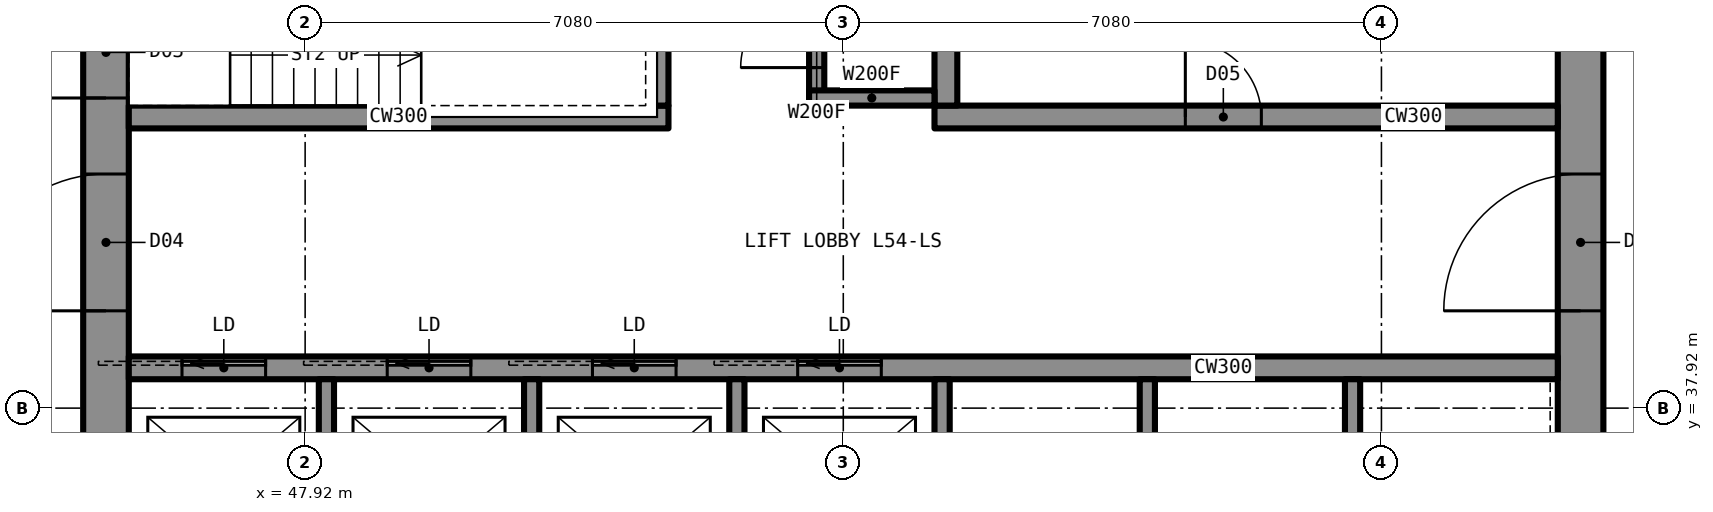
"""IFC4 building model, lengths in metres.
Left out: names, types, materials, properties, quantities, classifications, styles, units other than length and angle.
Written with IfcOpenShell. Run it as: python <this file> out.ifc"""

import sys

from ifc_helpers import new_model, si_unit, direction, frame, frame_2d, origin, place, context, subcontext, project, spatial, rectangle, extrude, element, fill, save


model = new_model("IFC4")
c1 = context("Model", 3, precision=1e-05, world=origin(), true_north=direction((0.0, 1.0)))
c2 = subcontext(c1, "Body", "Model", "MODEL_VIEW")
j1 = project(units=[si_unit("LENGTHUNIT", "METRE"), si_unit("PLANEANGLEUNIT", "RADIAN")], contexts=[c1])
p1 = place(None, origin())
s1 = spatial("IfcSite", under=j1, at=p1, CompositionType="ELEMENT")
p2 = place(p1, origin())
s2 = spatial("IfcBuilding", under=s1, at=p2, CompositionType="ELEMENT")
p3 = place(p2, frame((0.0, 0.0, 193.3)))
s3 = spatial("IfcBuildingStorey", under=s2, at=p3, CompositionType="ELEMENT", Elevation=193.3)
p4 = place(p3, frame((64.7, 35.6, 0.0), z_axis=(0.0, 0.0, 1.0), x_axis=(0.0, 1.0, 0.0)))
e1 = element("IfcWall", 1, at=p4, inside=s3, PredefinedType="SHEAR", context=c2, shape_type="SweptSolid", body=[
    extrude(rectangle(XDim=18.8, YDim=0.6, at=frame_2d((9.4, 0.0))), origin(), (0.0, 0.0, 1.0), 3.5),
])
p5 = place(p4, frame((13.4, 0.0, 0.0)))
e2 = element("IfcOpeningElement", 2, at=p5, cuts=e1, PredefinedType="OPENING", context=c2, shape_type="SweptSolid", body=[
    extrude(rectangle(XDim=1.8, YDim=2.2, at=frame_2d((0.9, 1.1))), frame((0.0, 0.31, 0.0), z_axis=(0.0, -1.0, 0.0), x_axis=(1.0, 0.0, 0.0)), (0.0, 0.0, 1.0), 0.62),
])
p6 = place(p4, frame((3.6, 0.0, 0.0)))
e3 = element("IfcOpeningElement", 3, at=p6, cuts=e1, PredefinedType="OPENING", context=c2, shape_type="SweptSolid", body=[
    extrude(rectangle(XDim=1.8, YDim=2.2, at=frame_2d((0.9, 1.1))), frame((0.0, 0.31, 0.0), z_axis=(0.0, -1.0, 0.0), x_axis=(1.0, 0.0, 0.0)), (0.0, 0.0, 1.0), 0.62),
])
p7 = place(p3, frame((45.3, 35.6, 0.0), z_axis=(0.0, 0.0, 1.0), x_axis=(0.0, 1.0, 0.0)))
e4 = element("IfcWall", 4, at=p7, inside=s3, PredefinedType="SHEAR", context=c2, shape_type="SweptSolid", body=[
    extrude(rectangle(XDim=18.8, YDim=0.6, at=frame_2d((9.4, 0.0))), origin(), (0.0, 0.0, 1.0), 3.5),
])
p8 = place(p7, frame((13.4, 0.0, 0.0)))
e5 = element("IfcOpeningElement", 5, at=p8, cuts=e4, PredefinedType="OPENING", context=c2, shape_type="SweptSolid", body=[
    extrude(rectangle(XDim=1.8, YDim=2.2, at=frame_2d((0.9, 1.1))), frame((0.0, 0.31, 0.0), z_axis=(0.0, -1.0, 0.0), x_axis=(1.0, 0.0, 0.0)), (0.0, 0.0, 1.0), 0.62),
])
p9 = place(p7, frame((3.6, 0.0, 0.0)))
e6 = element("IfcOpeningElement", 6, at=p9, cuts=e4, PredefinedType="OPENING", context=c2, shape_type="SweptSolid", body=[
    extrude(rectangle(XDim=1.8, YDim=2.2, at=frame_2d((0.9, 1.1))), frame((0.0, 0.31, 0.0), z_axis=(0.0, -1.0, 0.0), x_axis=(1.0, 0.0, 0.0)), (0.0, 0.0, 1.0), 0.62),
])
p10 = place(p7, frame((6.4, 0.0, 0.0)))
e7 = element("IfcOpeningElement", 7, at=p10, cuts=e4, PredefinedType="OPENING", context=c2, shape_type="SweptSolid", body=[
    extrude(rectangle(XDim=1.2, YDim=2.2, at=frame_2d((0.6, 1.1))), frame((0.0, 0.31, 0.0), z_axis=(0.0, -1.0, 0.0), x_axis=(1.0, 0.0, 0.0)), (0.0, 0.0, 1.0), 0.62),
])
p11 = place(p3, frame((45.6, 38.45, 0.0), z_axis=(0.0, 0.0, 1.0), x_axis=(1.0, 0.0, 0.0)))
e8 = element("IfcWall", 8, at=p11, inside=s3, PredefinedType="SHEAR", context=c2, shape_type="SweptSolid", body=[
    extrude(rectangle(XDim=18.8, YDim=0.3, at=frame_2d((9.4, 0.0))), origin(), (0.0, 0.0, 1.0), 3.5),
])
p12 = place(p11, frame((0.7, 0.0, 0.0)))
e9 = element("IfcOpeningElement", 9, at=p12, cuts=e8, PredefinedType="OPENING", context=c2, shape_type="SweptSolid", body=[
    extrude(rectangle(XDim=1.1, YDim=2.2, at=frame_2d((0.55, 1.1))), frame((0.0, 0.16, 0.0), z_axis=(0.0, -1.0, 0.0), x_axis=(1.0, 0.0, 0.0)), (0.0, 0.0, 1.0), 0.32),
])
p13 = place(p11, frame((3.4, 0.0, 0.0)))
e10 = element("IfcOpeningElement", 10, at=p13, cuts=e8, PredefinedType="OPENING", context=c2, shape_type="SweptSolid", body=[
    extrude(rectangle(XDim=1.1, YDim=2.2, at=frame_2d((0.55, 1.1))), frame((0.0, 0.16, 0.0), z_axis=(0.0, -1.0, 0.0), x_axis=(1.0, 0.0, 0.0)), (0.0, 0.0, 1.0), 0.32),
])
p14 = place(p11, frame((6.1, 0.0, 0.0)))
e11 = element("IfcOpeningElement", 11, at=p14, cuts=e8, PredefinedType="OPENING", context=c2, shape_type="SweptSolid", body=[
    extrude(rectangle(XDim=1.1, YDim=2.2, at=frame_2d((0.55, 1.1))), frame((0.0, 0.16, 0.0), z_axis=(0.0, -1.0, 0.0), x_axis=(1.0, 0.0, 0.0)), (0.0, 0.0, 1.0), 0.32),
])
p15 = place(p11, frame((8.8, 0.0, 0.0)))
e12 = element("IfcOpeningElement", 12, at=p15, cuts=e8, PredefinedType="OPENING", context=c2, shape_type="SweptSolid", body=[
    extrude(rectangle(XDim=1.1, YDim=2.2, at=frame_2d((0.55, 1.1))), frame((0.0, 0.16, 0.0), z_axis=(0.0, -1.0, 0.0), x_axis=(1.0, 0.0, 0.0)), (0.0, 0.0, 1.0), 0.32),
])
p16 = place(p3, frame((45.6, 41.75, 0.0), z_axis=(0.0, 0.0, 1.0), x_axis=(1.0, 0.0, 0.0)))
e13 = element("IfcWall", 13, at=p16, inside=s3, PredefinedType="SHEAR", context=c2, shape_type="SweptSolid", body=[
    extrude(rectangle(XDim=7.1, YDim=0.3, at=frame_2d((3.55, 0.0))), origin(), (0.0, 0.0, 1.0), 3.5),
])
p17 = place(p3, frame((56.2, 41.75, 0.0), z_axis=(0.0, 0.0, 1.0), x_axis=(1.0, 0.0, 0.0)))
e14 = element("IfcWall", 14, at=p17, inside=s3, PredefinedType="SHEAR", context=c2, shape_type="SweptSolid", body=[
    extrude(rectangle(XDim=8.2, YDim=0.3, at=frame_2d((4.1, 0.0))), origin(), (0.0, 0.0, 1.0), 3.5),
])
p18 = place(p17, frame((3.3, 0.0, 0.0)))
e15 = element("IfcOpeningElement", 15, at=p18, cuts=e14, PredefinedType="OPENING", context=c2, shape_type="SweptSolid", body=[
    extrude(rectangle(XDim=1.0, YDim=2.1, at=frame_2d((0.5, 1.05))), frame((0.0, 0.16, 0.0), z_axis=(0.0, -1.0, 0.0), x_axis=(1.0, 0.0, 0.0)), (0.0, 0.0, 1.0), 0.32),
])
p19 = place(p3, frame((52.55, 41.9, 0.0), z_axis=(0.0, 0.0, 1.0), x_axis=(0.0, 1.0, 0.0)))
e16 = element("IfcWall", 16, at=p19, inside=s3, PredefinedType="SHEAR", context=c2, shape_type="SweptSolid", body=[
    extrude(rectangle(XDim=6.2, YDim=0.3, at=frame_2d((3.1, 0.0))), origin(), (0.0, 0.0, 1.0), 3.5),
])
p20 = place(p19, frame((4.125, 0.0, 0.0)))
e17 = element("IfcOpeningElement", 17, at=p20, cuts=e16, PredefinedType="OPENING", context=c2, shape_type="SweptSolid", body=[
    extrude(rectangle(XDim=1.2, YDim=2.2, at=frame_2d((0.6, 1.1))), frame((0.0, 0.16, 0.0), z_axis=(0.0, -1.0, 0.0), x_axis=(1.0, 0.0, 0.0)), (0.0, 0.0, 1.0), 0.32),
])
p21 = place(p3, frame((56.35, 41.9, 0.0), z_axis=(0.0, 0.0, 1.0), x_axis=(0.0, 1.0, 0.0)))
e18 = element("IfcWall", 18, at=p21, inside=s3, PredefinedType="SHEAR", context=c2, shape_type="SweptSolid", body=[
    extrude(rectangle(XDim=9.5, YDim=0.3, at=frame_2d((4.75, 0.0))), origin(), (0.0, 0.0, 1.0), 3.5),
])
p22 = place(p21, frame((7.1, 0.0, 0.0)))
e19 = element("IfcOpeningElement", 19, at=p22, cuts=e18, PredefinedType="OPENING", context=c2, shape_type="SweptSolid", body=[
    extrude(rectangle(XDim=1.8, YDim=2.2, at=frame_2d((0.9, 1.1))), frame((0.0, 0.16, 0.0), z_axis=(0.0, -1.0, 0.0), x_axis=(1.0, 0.0, 0.0)), (0.0, 0.0, 1.0), 0.32),
])
p23 = place(p3, frame((54.35, 42.0, 0.0), z_axis=(0.0, 0.0, 1.0), x_axis=(0.0, 1.0, 0.0)))
e20 = element("IfcWall", 20, at=p23, inside=s3, PredefinedType="PARTITIONING", context=c2, shape_type="SweptSolid", body=[
    extrude(rectangle(XDim=2.5, YDim=0.2, at=frame_2d((1.25, 0.0))), origin(), (0.0, 0.0, 1.0), 3.33),
])
p24 = place(p23, frame((0.75, 0.0, 0.0)))
e21 = element("IfcOpeningElement", 21, at=p24, cuts=e20, PredefinedType="OPENING", context=c2, shape_type="SweptSolid", body=[
    extrude(rectangle(XDim=1.0, YDim=2.1, at=frame_2d((0.5, 1.05))), frame((0.0, 0.11, 0.0), z_axis=(0.0, -1.0, 0.0), x_axis=(1.0, 0.0, 0.0)), (0.0, 0.0, 1.0), 0.22),
])
p25 = place(p3, frame((54.25, 42.0, 0.0), z_axis=(0.0, 0.0, 1.0), x_axis=(1.0, 0.0, 0.0)))
e22 = element("IfcWall", 22, at=p25, inside=s3, PredefinedType="PARTITIONING", context=c2, shape_type="SweptSolid", body=[
    extrude(rectangle(XDim=1.95, YDim=0.2, at=frame_2d((0.975, 0.0))), origin(), (0.0, 0.0, 1.0), 3.33),
])
for number, where, z_axis, x_axis in (
    (23, (48.2, 35.6, 0.0), (0.0, 0.0, 1.0), (0.0, 1.0, 0.0)),
    (24, (50.9, 35.6, 0.0), (0.0, 0.0, 1.0), (0.0, 1.0, 0.0)),
    (25, (53.6, 35.6, 0.0), (0.0, 0.0, 1.0), (0.0, 1.0, 0.0)),
    (26, (56.3, 35.6, 0.0), (0.0, 0.0, 1.0), (0.0, 1.0, 0.0)),
    (27, (59.0, 35.6, 0.0), (0.0, 0.0, 1.0), (0.0, 1.0, 0.0)),
    (28, (61.7, 35.6, 0.0), (0.0, 0.0, 1.0), (0.0, 1.0, 0.0)),
):
    element("IfcWall", number, at=place(p3, frame(where, z_axis=z_axis, x_axis=x_axis)), inside=s3, PredefinedType="PARTITIONING", context=c2, shape_type="SweptSolid", body=[
        extrude(rectangle(XDim=2.7, YDim=0.2, at=frame_2d((1.35, 0.0))), origin(), (0.0, 0.0, 1.0), 3.33),
    ])
p26 = place(p9, origin())
e29 = element("IfcDoor", 29, at=p26, inside=s3, OperationType="DOUBLE_DOOR_SINGLE_SWING", PredefinedType="DOOR", context=c2, shape_type="SweptSolid", body=[
    extrude(rectangle(XDim=1.8, YDim=2.2, at=frame_2d((0.9, 1.1))), frame((0.0, 0.025, 0.0), z_axis=(0.0, -1.0, 0.0), x_axis=(1.0, 0.0, 0.0)), (0.0, 0.0, 1.0), 0.05),
])
fill(e6, e29)
p27 = place(p6, origin())
e30 = element("IfcDoor", 30, at=p27, inside=s3, OperationType="DOUBLE_DOOR_SINGLE_SWING", PredefinedType="DOOR", context=c2, shape_type="SweptSolid", body=[
    extrude(rectangle(XDim=1.8, YDim=2.2, at=frame_2d((0.9, 1.1))), frame((0.0, 0.025, 0.0), z_axis=(0.0, -1.0, 0.0), x_axis=(1.0, 0.0, 0.0)), (0.0, 0.0, 1.0), 0.05),
])
fill(e3, e30)
p28 = place(p10, origin())
e31 = element("IfcDoor", 31, at=p28, inside=s3, OperationType="SINGLE_SWING_LEFT", PredefinedType="DOOR", context=c2, shape_type="SweptSolid", body=[
    extrude(rectangle(XDim=1.2, YDim=2.2, at=frame_2d((0.6, 1.1))), frame((0.0, 0.025, 0.0), z_axis=(0.0, -1.0, 0.0), x_axis=(1.0, 0.0, 0.0)), (0.0, 0.0, 1.0), 0.05),
])
fill(e7, e31)
p29 = place(p18, origin())
e32 = element("IfcDoor", 32, at=p29, inside=s3, OperationType="SINGLE_SWING_LEFT", PredefinedType="DOOR", context=c2, shape_type="SweptSolid", body=[
    extrude(rectangle(XDim=1.0, YDim=2.1, at=frame_2d((0.5, 1.05))), frame((0.0, 0.025, 0.0), z_axis=(0.0, -1.0, 0.0), x_axis=(1.0, 0.0, 0.0)), (0.0, 0.0, 1.0), 0.05),
])
fill(e15, e32)
p30 = place(p12, origin())
e33 = element("IfcDoor", 33, at=p30, inside=s3, OperationType="SLIDING_TO_LEFT", PredefinedType="DOOR", context=c2, shape_type="SweptSolid", body=[
    extrude(rectangle(XDim=1.1, YDim=2.2, at=frame_2d((0.55, 1.1))), frame((0.0, 0.025, 0.0), z_axis=(0.0, -1.0, 0.0), x_axis=(1.0, 0.0, 0.0)), (0.0, 0.0, 1.0), 0.05),
])
fill(e9, e33)
p31 = place(p13, origin())
e34 = element("IfcDoor", 34, at=p31, inside=s3, OperationType="SLIDING_TO_LEFT", PredefinedType="DOOR", context=c2, shape_type="SweptSolid", body=[
    extrude(rectangle(XDim=1.1, YDim=2.2, at=frame_2d((0.55, 1.1))), frame((0.0, 0.025, 0.0), z_axis=(0.0, -1.0, 0.0), x_axis=(1.0, 0.0, 0.0)), (0.0, 0.0, 1.0), 0.05),
])
fill(e10, e34)
p32 = place(p14, origin())
e35 = element("IfcDoor", 35, at=p32, inside=s3, OperationType="SLIDING_TO_LEFT", PredefinedType="DOOR", context=c2, shape_type="SweptSolid", body=[
    extrude(rectangle(XDim=1.1, YDim=2.2, at=frame_2d((0.55, 1.1))), frame((0.0, 0.025, 0.0), z_axis=(0.0, -1.0, 0.0), x_axis=(1.0, 0.0, 0.0)), (0.0, 0.0, 1.0), 0.05),
])
fill(e11, e35)
p33 = place(p15, origin())
e36 = element("IfcDoor", 36, at=p33, inside=s3, OperationType="SLIDING_TO_LEFT", PredefinedType="DOOR", context=c2, shape_type="SweptSolid", body=[
    extrude(rectangle(XDim=1.1, YDim=2.2, at=frame_2d((0.55, 1.1))), frame((0.0, 0.025, 0.0), z_axis=(0.0, -1.0, 0.0), x_axis=(1.0, 0.0, 0.0)), (0.0, 0.0, 1.0), 0.05),
])
fill(e12, e36)
save(model, sys.argv[1])
